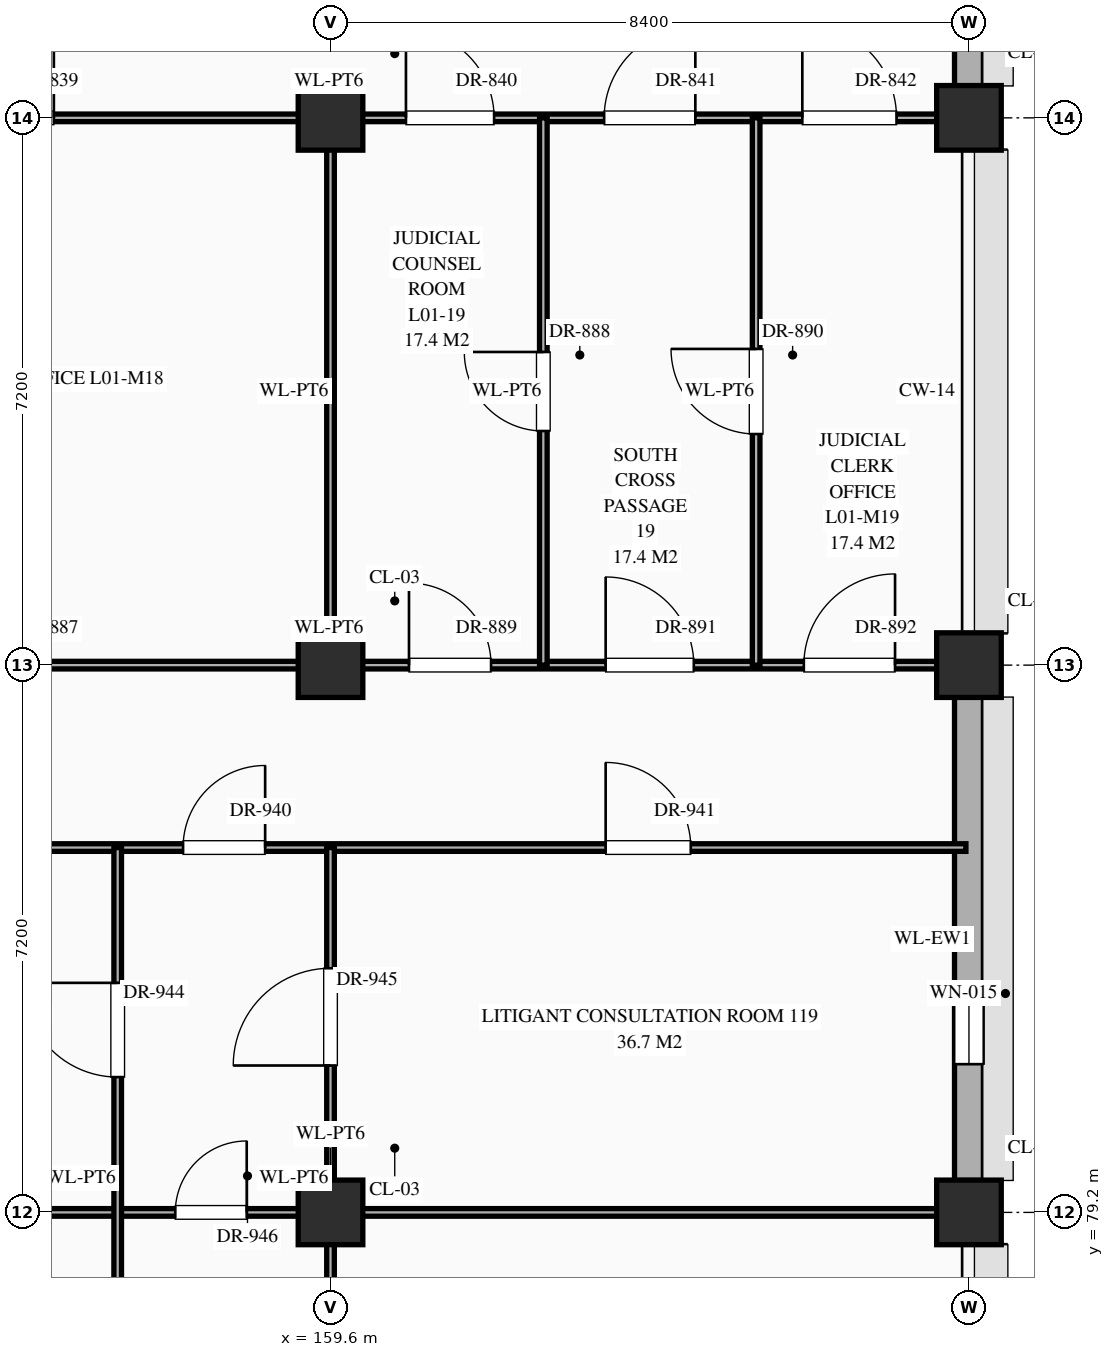
"""IFC4 building model, lengths in metres.
Left out: names, types, materials, properties, quantities, classifications, styles, units other than length and angle.
Written with IfcOpenShell. Run it as: python <this file> out.ifc"""

import sys

from ifc_helpers import new_model, si_unit, direction, frame, frame_2d, origin, origin_2d, place, context, subcontext, project, spatial, rectangle, extrude, element, fill, save


model = new_model("IFC4")
c1 = context("Model", 3, precision=1e-05, world=origin(), true_north=direction((0.0, 1.0)))
c2 = subcontext(c1, "Body", "Model", "MODEL_VIEW")
j1 = project(units=[si_unit("LENGTHUNIT", "METRE"), si_unit("PLANEANGLEUNIT", "RADIAN")], contexts=[c1])
p1 = place(None, origin())
s1 = spatial("IfcSite", under=j1, at=p1, CompositionType="ELEMENT")
p2 = place(p1, origin())
s2 = spatial("IfcBuilding", under=s1, at=p2, CompositionType="ELEMENT")
p3 = place(p2, origin())
s3 = spatial("IfcBuildingStorey", under=s2, at=p3, CompositionType="ELEMENT", Elevation=0.0)
for number, where, z_axis, x_axis in (
    (1, (159.6, 79.2, 0.0), (0.0, 0.0, 1.0), (1.0, 0.0, 0.0)),
    (2, (159.6, 86.4, 0.0), (0.0, 0.0, 1.0), (1.0, 0.0, 0.0)),
    (3, (159.6, 93.6, 0.0), (0.0, 0.0, 1.0), (1.0, 0.0, 0.0)),
    (4, (168.0, 79.2, 0.0), (0.0, 0.0, 1.0), (1.0, 0.0, 0.0)),
    (5, (168.0, 86.4, 0.0), (0.0, 0.0, 1.0), (1.0, 0.0, 0.0)),
    (6, (168.0, 93.6, 0.0), (0.0, 0.0, 1.0), (1.0, 0.0, 0.0)),
):
    element("IfcColumn", number, at=place(p3, frame(where, z_axis=z_axis, x_axis=x_axis)), inside=s3, PredefinedType="COLUMN", context=c2, shape_type="SweptSolid", body=[
        extrude(rectangle(XDim=0.85, YDim=0.85, at=origin_2d()), origin(), (0.0, 0.0, 1.0), 5.4),
    ])
p4 = place(p3, frame((168.0, 79.62, 0.0), z_axis=(0.0, 0.0, 1.0), x_axis=(0.0, 1.0, 0.0)))
e7 = element("IfcWall", 7, at=p4, inside=s3, PredefinedType="STANDARD", context=c2, shape_type="SweptSolid", body=[
    extrude(rectangle(XDim=6.36, YDim=0.38, at=frame_2d((3.18, 0.0))), origin(), (0.0, 0.0, 1.0), 4.47),
])
p5 = place(p4, frame((1.53, 0.0, 0.85)))
e8 = element("IfcOpeningElement", 8, at=p5, cuts=e7, PredefinedType="OPENING", context=c2, shape_type="SweptSolid", body=[
    extrude(rectangle(XDim=0.9, YDim=1.2, at=frame_2d((0.45, 0.6))), frame((0.0, 0.202, 0.0), z_axis=(0.0, -1.0, 0.0), x_axis=(1.0, 0.0, 0.0)), (0.0, 0.0, 1.0), 0.404),
])
p6 = place(p3, frame((168.0, 94.02, 0.0), z_axis=(0.0, 0.0, 1.0), x_axis=(0.0, 1.0, 0.0)))
e9 = element("IfcWall", 9, at=p6, inside=s3, PredefinedType="STANDARD", context=c2, shape_type="SweptSolid", body=[
    extrude(rectangle(XDim=6.36, YDim=0.38, at=frame_2d((3.18, 0.0))), origin(), (0.0, 0.0, 1.0), 4.47),
])
p7 = place(p6, frame((3.955, 0.0, 0.85)))
e10 = element("IfcOpeningElement", 10, at=p7, cuts=e9, PredefinedType="OPENING", context=c2, shape_type="SweptSolid", body=[
    extrude(rectangle(XDim=1.05, YDim=1.56, at=frame_2d((0.525, 0.78))), frame((0.0, 0.202, 0.0), z_axis=(0.0, -1.0, 0.0), x_axis=(1.0, 0.0, 0.0)), (0.0, 0.0, 1.0), 0.404),
])
p8 = place(p3, frame((151.24, 79.2, 0.0), z_axis=(0.0, 0.0, 1.0), x_axis=(1.0, 0.0, 0.0)))
e11 = element("IfcWall", 11, at=p8, inside=s3, PredefinedType="STANDARD", context=c2, shape_type="SweptSolid", body=[
    extrude(rectangle(XDim=16.72, YDim=0.1, at=frame_2d((8.36, 0.0))), origin(), (0.0, 0.0, 1.0), 4.27),
])
p9 = place(p8, frame((6.317, 0.0, 0.0)))
e12 = element("IfcOpeningElement", 12, at=p9, cuts=e11, PredefinedType="OPENING", context=c2, shape_type="SweptSolid", body=[
    extrude(rectangle(XDim=0.94, YDim=2.3, at=frame_2d((0.47, 1.15))), frame((0.0, 0.062, 0.0), z_axis=(0.0, -1.0, 0.0), x_axis=(1.0, 0.0, 0.0)), (0.0, 0.0, 1.0), 0.124),
])
p10 = place(p3, frame((140.0, 84.0, 0.0), z_axis=(0.0, 0.0, 1.0), x_axis=(1.0, 0.0, 0.0)))
e13 = element("IfcWall", 13, at=p10, inside=s3, PredefinedType="STANDARD", context=c2, shape_type="SweptSolid", body=[
    extrude(rectangle(XDim=27.96, YDim=0.1, at=frame_2d((13.98, 0.0))), origin(), (0.0, 0.0, 1.0), 5.12),
])
p11 = place(p10, frame((0.92, 0.0, 0.0)))
e14 = element("IfcOpeningElement", 14, at=p11, cuts=e13, PredefinedType="OPENING", context=c2, shape_type="SweptSolid", body=[
    extrude(rectangle(XDim=0.96, YDim=2.2, at=frame_2d((0.48, 1.1))), frame((0.0, 0.062, 0.0), z_axis=(0.0, -1.0, 0.0), x_axis=(1.0, 0.0, 0.0)), (0.0, 0.0, 1.0), 0.124),
])
p12 = place(p10, frame((6.5, 0.0, 0.0)))
e15 = element("IfcOpeningElement", 15, at=p12, cuts=e13, PredefinedType="OPENING", context=c2, shape_type="SweptSolid", body=[
    extrude(rectangle(XDim=1.0, YDim=2.25, at=frame_2d((0.5, 1.125))), frame((0.0, 0.062, 0.0), z_axis=(0.0, -1.0, 0.0), x_axis=(1.0, 0.0, 0.0)), (0.0, 0.0, 1.0), 0.124),
])
p13 = place(p10, frame((13.48, 0.0, 0.0)))
e16 = element("IfcOpeningElement", 16, at=p13, cuts=e13, PredefinedType="OPENING", context=c2, shape_type="SweptSolid", body=[
    extrude(rectangle(XDim=1.04, YDim=2.2, at=frame_2d((0.52, 1.1))), frame((0.0, 0.062, 0.0), z_axis=(0.0, -1.0, 0.0), x_axis=(1.0, 0.0, 0.0)), (0.0, 0.0, 1.0), 0.124),
])
p14 = place(p10, frame((17.66, 0.0, 0.0)))
e17 = element("IfcOpeningElement", 17, at=p14, cuts=e13, PredefinedType="OPENING", context=c2, shape_type="SweptSolid", body=[
    extrude(rectangle(XDim=1.08, YDim=2.25, at=frame_2d((0.54, 1.125))), frame((0.0, 0.062, 0.0), z_axis=(0.0, -1.0, 0.0), x_axis=(1.0, 0.0, 0.0)), (0.0, 0.0, 1.0), 0.124),
])
p15 = place(p10, frame((23.22, 0.0, 0.0)))
e18 = element("IfcOpeningElement", 18, at=p15, cuts=e13, PredefinedType="OPENING", context=c2, shape_type="SweptSolid", body=[
    extrude(rectangle(XDim=1.12, YDim=2.25, at=frame_2d((0.56, 1.125))), frame((0.0, 0.062, 0.0), z_axis=(0.0, -1.0, 0.0), x_axis=(1.0, 0.0, 0.0)), (0.0, 0.0, 1.0), 0.124),
])
p16 = place(p3, frame((151.2, 86.4, 0.0), z_axis=(0.0, 0.0, 1.0), x_axis=(1.0, 0.0, 0.0)))
e19 = element("IfcWall", 19, at=p16, inside=s3, PredefinedType="STANDARD", context=c2, shape_type="SweptSolid", body=[
    extrude(rectangle(XDim=16.76, YDim=0.1, at=frame_2d((8.38, 0.0))), origin(), (0.0, 0.0, 1.0), 4.27),
])
p17 = place(p16, frame((3.7, 0.0, 0.0)))
e20 = element("IfcOpeningElement", 20, at=p17, cuts=e19, PredefinedType="OPENING", context=c2, shape_type="SweptSolid", body=[
    extrude(rectangle(XDim=1.0, YDim=2.25, at=frame_2d((0.5, 1.125))), frame((0.0, 0.062, 0.0), z_axis=(0.0, -1.0, 0.0), x_axis=(1.0, 0.0, 0.0)), (0.0, 0.0, 1.0), 0.124),
])
p18 = place(p16, frame((9.433, 0.0, 0.0)))
e21 = element("IfcOpeningElement", 21, at=p18, cuts=e19, PredefinedType="OPENING", context=c2, shape_type="SweptSolid", body=[
    extrude(rectangle(XDim=1.08, YDim=2.25, at=frame_2d((0.54, 1.125))), frame((0.0, 0.062, 0.0), z_axis=(0.0, -1.0, 0.0), x_axis=(1.0, 0.0, 0.0)), (0.0, 0.0, 1.0), 0.124),
])
p19 = place(p16, frame((12.02, 0.0, 0.0)))
e22 = element("IfcOpeningElement", 22, at=p19, cuts=e19, PredefinedType="OPENING", context=c2, shape_type="SweptSolid", body=[
    extrude(rectangle(XDim=1.16, YDim=2.3, at=frame_2d((0.58, 1.15))), frame((0.0, 0.062, 0.0), z_axis=(0.0, -1.0, 0.0), x_axis=(1.0, 0.0, 0.0)), (0.0, 0.0, 1.0), 0.124),
])
p20 = place(p16, frame((14.627, 0.0, 0.0)))
e23 = element("IfcOpeningElement", 23, at=p20, cuts=e19, PredefinedType="OPENING", context=c2, shape_type="SweptSolid", body=[
    extrude(rectangle(XDim=1.2, YDim=2.35, at=frame_2d((0.6, 1.175))), frame((0.0, 0.062, 0.0), z_axis=(0.0, -1.0, 0.0), x_axis=(1.0, 0.0, 0.0)), (0.0, 0.0, 1.0), 0.124),
])
p21 = place(p3, frame((151.2, 93.6, 0.0), z_axis=(0.0, 0.0, 1.0), x_axis=(1.0, 0.0, 0.0)))
e24 = element("IfcWall", 24, at=p21, inside=s3, PredefinedType="STANDARD", context=c2, shape_type="SweptSolid", body=[
    extrude(rectangle(XDim=16.76, YDim=0.1, at=frame_2d((8.38, 0.0))), origin(), (0.0, 0.0, 1.0), 4.27),
])
p22 = place(p21, frame((3.64, 0.0, 0.0)))
e25 = element("IfcOpeningElement", 25, at=p22, cuts=e24, PredefinedType="OPENING", context=c2, shape_type="SweptSolid", body=[
    extrude(rectangle(XDim=1.12, YDim=2.25, at=frame_2d((0.56, 1.125))), frame((0.0, 0.062, 0.0), z_axis=(0.0, -1.0, 0.0), x_axis=(1.0, 0.0, 0.0)), (0.0, 0.0, 1.0), 0.124),
])
p23 = place(p21, frame((9.393, 0.0, 0.0)))
e26 = element("IfcOpeningElement", 26, at=p23, cuts=e24, PredefinedType="OPENING", context=c2, shape_type="SweptSolid", body=[
    extrude(rectangle(XDim=1.16, YDim=2.3, at=frame_2d((0.58, 1.15))), frame((0.0, 0.062, 0.0), z_axis=(0.0, -1.0, 0.0), x_axis=(1.0, 0.0, 0.0)), (0.0, 0.0, 1.0), 0.124),
])
p24 = place(p21, frame((12.0, 0.0, 0.0)))
e27 = element("IfcOpeningElement", 27, at=p24, cuts=e24, PredefinedType="OPENING", context=c2, shape_type="SweptSolid", body=[
    extrude(rectangle(XDim=1.2, YDim=2.35, at=frame_2d((0.6, 1.175))), frame((0.0, 0.062, 0.0), z_axis=(0.0, -1.0, 0.0), x_axis=(1.0, 0.0, 0.0)), (0.0, 0.0, 1.0), 0.124),
])
p25 = place(p21, frame((14.607, 0.0, 0.0)))
e28 = element("IfcOpeningElement", 28, at=p25, cuts=e24, PredefinedType="OPENING", context=c2, shape_type="SweptSolid", body=[
    extrude(rectangle(XDim=1.24, YDim=2.3, at=frame_2d((0.62, 1.15))), frame((0.0, 0.062, 0.0), z_axis=(0.0, -1.0, 0.0), x_axis=(1.0, 0.0, 0.0)), (0.0, 0.0, 1.0), 0.124),
])
p26 = place(p3, frame((156.8, 57.6, 0.0), z_axis=(0.0, 0.0, 1.0), x_axis=(0.0, 1.0, 0.0)))
e29 = element("IfcWall", 29, at=p26, inside=s3, PredefinedType="STANDARD", context=c2, shape_type="SweptSolid", body=[
    extrude(rectangle(XDim=26.4, YDim=0.1, at=frame_2d((13.2, 0.0))), origin(), (0.0, 0.0, 1.0), 5.12),
])
p27 = place(p26, frame((23.38, 0.0, 0.0)))
e30 = element("IfcOpeningElement", 30, at=p27, cuts=e29, PredefinedType="OPENING", context=c2, shape_type="SweptSolid", body=[
    extrude(rectangle(XDim=1.24, YDim=2.3, at=frame_2d((0.62, 1.15))), frame((0.0, 0.062, 0.0), z_axis=(0.0, -1.0, 0.0), x_axis=(1.0, 0.0, 0.0)), (0.0, 0.0, 1.0), 0.124),
])
p28 = place(p26, frame((3.07, 0.0, 0.0)))
e31 = element("IfcOpeningElement", 31, at=p28, cuts=e29, PredefinedType="OPENING", context=c2, shape_type="SweptSolid", body=[
    extrude(rectangle(XDim=1.06, YDim=2.4, at=frame_2d((0.53, 1.2))), frame((0.0, 0.062, 0.0), z_axis=(0.0, -1.0, 0.0), x_axis=(1.0, 0.0, 0.0)), (0.0, 0.0, 1.0), 0.124),
])
p29 = place(p26, frame((10.23, 0.0, 0.0)))
e32 = element("IfcOpeningElement", 32, at=p29, cuts=e29, PredefinedType="OPENING", context=c2, shape_type="SweptSolid", body=[
    extrude(rectangle(XDim=1.14, YDim=2.4, at=frame_2d((0.57, 1.2))), frame((0.0, 0.062, 0.0), z_axis=(0.0, -1.0, 0.0), x_axis=(1.0, 0.0, 0.0)), (0.0, 0.0, 1.0), 0.124),
])
p30 = place(p26, frame((17.55, 0.0, 0.0)))
e33 = element("IfcOpeningElement", 33, at=p30, cuts=e29, PredefinedType="OPENING", context=c2, shape_type="SweptSolid", body=[
    extrude(rectangle(XDim=0.9, YDim=2.15, at=frame_2d((0.45, 1.075))), frame((0.0, 0.062, 0.0), z_axis=(0.0, -1.0, 0.0), x_axis=(1.0, 0.0, 0.0)), (0.0, 0.0, 1.0), 0.124),
])
p31 = place(p3, frame((159.6, 43.2, 0.0), z_axis=(0.0, 0.0, 1.0), x_axis=(0.0, 1.0, 0.0)))
e34 = element("IfcWall", 34, at=p31, inside=s3, PredefinedType="STANDARD", context=c2, shape_type="SweptSolid", body=[
    extrude(rectangle(XDim=40.8, YDim=0.1, at=frame_2d((20.4, 0.0))), origin(), (0.0, 0.0, 1.0), 4.37),
])
p32 = place(p31, frame((37.933, 0.0, 0.0)))
e35 = element("IfcOpeningElement", 35, at=p32, cuts=e34, PredefinedType="OPENING", context=c2, shape_type="SweptSolid", body=[
    extrude(rectangle(XDim=1.28, YDim=2.35, at=frame_2d((0.64, 1.175))), frame((0.0, 0.062, 0.0), z_axis=(0.0, -1.0, 0.0), x_axis=(1.0, 0.0, 0.0)), (0.0, 0.0, 1.0), 0.124),
])
p33 = place(p31, frame((0.942, 0.0, 0.0)))
e36 = element("IfcOpeningElement", 36, at=p33, cuts=e34, PredefinedType="OPENING", context=c2, shape_type="SweptSolid", body=[
    extrude(rectangle(XDim=0.86, YDim=2.1, at=frame_2d((0.43, 1.05))), frame((0.0, 0.062, 0.0), z_axis=(0.0, -1.0, 0.0), x_axis=(1.0, 0.0, 0.0)), (0.0, 0.0, 1.0), 0.124),
])
p34 = place(p31, frame((4.167, 0.0, 0.0)))
e37 = element("IfcOpeningElement", 37, at=p34, cuts=e34, PredefinedType="OPENING", context=c2, shape_type="SweptSolid", body=[
    extrude(rectangle(XDim=0.92, YDim=2.15, at=frame_2d((0.46, 1.075))), frame((0.0, 0.062, 0.0), z_axis=(0.0, -1.0, 0.0), x_axis=(1.0, 0.0, 0.0)), (0.0, 0.0, 1.0), 0.124),
])
p35 = place(p31, frame((10.32, 0.0, 0.0)))
e38 = element("IfcOpeningElement", 38, at=p35, cuts=e34, PredefinedType="OPENING", context=c2, shape_type="SweptSolid", body=[
    extrude(rectangle(XDim=0.96, YDim=2.2, at=frame_2d((0.48, 1.1))), frame((0.0, 0.062, 0.0), z_axis=(0.0, -1.0, 0.0), x_axis=(1.0, 0.0, 0.0)), (0.0, 0.0, 1.0), 0.124),
])
p36 = place(p31, frame((17.5, 0.0, 0.0)))
e39 = element("IfcOpeningElement", 39, at=p36, cuts=e34, PredefinedType="OPENING", context=c2, shape_type="SweptSolid", body=[
    extrude(rectangle(XDim=1.0, YDim=2.25, at=frame_2d((0.5, 1.125))), frame((0.0, 0.062, 0.0), z_axis=(0.0, -1.0, 0.0), x_axis=(1.0, 0.0, 0.0)), (0.0, 0.0, 1.0), 0.124),
])
p37 = place(p31, frame((24.68, 0.0, 0.0)))
e40 = element("IfcOpeningElement", 40, at=p37, cuts=e34, PredefinedType="OPENING", context=c2, shape_type="SweptSolid", body=[
    extrude(rectangle(XDim=1.04, YDim=2.2, at=frame_2d((0.52, 1.1))), frame((0.0, 0.062, 0.0), z_axis=(0.0, -1.0, 0.0), x_axis=(1.0, 0.0, 0.0)), (0.0, 0.0, 1.0), 0.124),
])
p38 = place(p31, frame((31.86, 0.0, 0.0)))
e41 = element("IfcOpeningElement", 41, at=p38, cuts=e34, PredefinedType="OPENING", context=c2, shape_type="SweptSolid", body=[
    extrude(rectangle(XDim=1.08, YDim=2.25, at=frame_2d((0.54, 1.125))), frame((0.0, 0.062, 0.0), z_axis=(0.0, -1.0, 0.0), x_axis=(1.0, 0.0, 0.0)), (0.0, 0.0, 1.0), 0.124),
])
p39 = place(p3, frame((159.6, 86.4, 0.0), z_axis=(0.0, 0.0, 1.0), x_axis=(0.0, 1.0, 0.0)))
e42 = element("IfcWall", 42, at=p39, inside=s3, PredefinedType="STANDARD", context=c2, shape_type="SweptSolid", body=[
    extrude(rectangle(XDim=7.2, YDim=0.1, at=frame_2d((3.6, 0.0))), origin(), (0.0, 0.0, 1.0), 4.37),
])
p40 = place(p3, frame((162.4, 86.4, 0.0), z_axis=(0.0, 0.0, 1.0), x_axis=(0.0, 1.0, 0.0)))
e43 = element("IfcWall", 43, at=p40, inside=s3, PredefinedType="STANDARD", context=c2, shape_type="SweptSolid", body=[
    extrude(rectangle(XDim=7.2, YDim=0.1, at=frame_2d((3.6, 0.0))), origin(), (0.0, 0.0, 1.0), 5.12),
])
p41 = place(p40, frame((3.08, 0.0, 0.0)))
e44 = element("IfcOpeningElement", 44, at=p41, cuts=e43, PredefinedType="OPENING", context=c2, shape_type="SweptSolid", body=[
    extrude(rectangle(XDim=1.04, YDim=2.2, at=frame_2d((0.52, 1.1))), frame((0.0, 0.062, 0.0), z_axis=(0.0, -1.0, 0.0), x_axis=(1.0, 0.0, 0.0)), (0.0, 0.0, 1.0), 0.124),
])
p42 = place(p3, frame((165.2, 86.4, 0.0), z_axis=(0.0, 0.0, 1.0), x_axis=(0.0, 1.0, 0.0)))
e45 = element("IfcWall", 45, at=p42, inside=s3, PredefinedType="STANDARD", context=c2, shape_type="SweptSolid", body=[
    extrude(rectangle(XDim=7.2, YDim=0.1, at=frame_2d((3.6, 0.0))), origin(), (0.0, 0.0, 1.0), 5.12),
])
p43 = place(p42, frame((3.04, 0.0, 0.0)))
e46 = element("IfcOpeningElement", 46, at=p43, cuts=e45, PredefinedType="OPENING", context=c2, shape_type="SweptSolid", body=[
    extrude(rectangle(XDim=1.12, YDim=2.25, at=frame_2d((0.56, 1.125))), frame((0.0, 0.062, 0.0), z_axis=(0.0, -1.0, 0.0), x_axis=(1.0, 0.0, 0.0)), (0.0, 0.0, 1.0), 0.124),
])
p44 = place(p5, origin())
e47 = element("IfcWindow", 47, at=p44, inside=s3, PartitioningType="SINGLE_PANEL", PredefinedType="WINDOW", context=c2, shape_type="SweptSolid", body=[
    extrude(rectangle(XDim=0.9, YDim=1.2, at=frame_2d((0.45, 0.6))), frame((0.0, 0.03, 0.0), z_axis=(0.0, -1.0, 0.0), x_axis=(1.0, 0.0, 0.0)), (0.0, 0.0, 1.0), 0.06),
])
fill(e8, e47)
p45 = place(p22, origin())
e48 = element("IfcDoor", 48, at=p45, inside=s3, OperationType="SINGLE_SWING_RIGHT", PredefinedType="DOOR", context=c2, shape_type="SweptSolid", body=[
    extrude(rectangle(XDim=1.12, YDim=2.25, at=frame_2d((0.56, 1.125))), frame((0.0, 0.025, 0.0), z_axis=(0.0, -1.0, 0.0), x_axis=(1.0, 0.0, 0.0)), (0.0, 0.0, 1.0), 0.05),
])
fill(e25, e48)
p46 = place(p23, origin())
e49 = element("IfcDoor", 49, at=p46, inside=s3, OperationType="SINGLE_SWING_LEFT", PredefinedType="DOOR", context=c2, shape_type="SweptSolid", body=[
    extrude(rectangle(XDim=1.16, YDim=2.3, at=frame_2d((0.58, 1.15))), frame((0.0, 0.025, 0.0), z_axis=(0.0, -1.0, 0.0), x_axis=(1.0, 0.0, 0.0)), (0.0, 0.0, 1.0), 0.05),
])
fill(e26, e49)
p47 = place(p24, origin())
e50 = element("IfcDoor", 50, at=p47, inside=s3, OperationType="SINGLE_SWING_RIGHT", PredefinedType="DOOR", context=c2, shape_type="SweptSolid", body=[
    extrude(rectangle(XDim=1.2, YDim=2.35, at=frame_2d((0.6, 1.175))), frame((0.0, 0.025, 0.0), z_axis=(0.0, -1.0, 0.0), x_axis=(1.0, 0.0, 0.0)), (0.0, 0.0, 1.0), 0.05),
])
fill(e27, e50)
p48 = place(p25, origin())
e51 = element("IfcDoor", 51, at=p48, inside=s3, OperationType="SINGLE_SWING_LEFT", PredefinedType="DOOR", context=c2, shape_type="SweptSolid", body=[
    extrude(rectangle(XDim=1.24, YDim=2.3, at=frame_2d((0.62, 1.15))), frame((0.0, 0.025, 0.0), z_axis=(0.0, -1.0, 0.0), x_axis=(1.0, 0.0, 0.0)), (0.0, 0.0, 1.0), 0.05),
])
fill(e28, e51)
p49 = place(p41, origin())
e52 = element("IfcDoor", 52, at=p49, inside=s3, OperationType="SINGLE_SWING_RIGHT", PredefinedType="DOOR", context=c2, shape_type="SweptSolid", body=[
    extrude(rectangle(XDim=1.04, YDim=2.2, at=frame_2d((0.52, 1.1))), frame((0.0, 0.025, 0.0), z_axis=(0.0, -1.0, 0.0), x_axis=(1.0, 0.0, 0.0)), (0.0, 0.0, 1.0), 0.05),
])
fill(e44, e52)
p50 = place(p18, origin())
e53 = element("IfcDoor", 53, at=p50, inside=s3, OperationType="SINGLE_SWING_LEFT", PredefinedType="DOOR", context=c2, shape_type="SweptSolid", body=[
    extrude(rectangle(XDim=1.08, YDim=2.25, at=frame_2d((0.54, 1.125))), frame((0.0, 0.025, 0.0), z_axis=(0.0, -1.0, 0.0), x_axis=(1.0, 0.0, 0.0)), (0.0, 0.0, 1.0), 0.05),
])
fill(e21, e53)
p51 = place(p43, origin())
e54 = element("IfcDoor", 54, at=p51, inside=s3, OperationType="SINGLE_SWING_RIGHT", PredefinedType="DOOR", context=c2, shape_type="SweptSolid", body=[
    extrude(rectangle(XDim=1.12, YDim=2.25, at=frame_2d((0.56, 1.125))), frame((0.0, 0.025, 0.0), z_axis=(0.0, -1.0, 0.0), x_axis=(1.0, 0.0, 0.0)), (0.0, 0.0, 1.0), 0.05),
])
fill(e46, e54)
p52 = place(p19, origin())
e55 = element("IfcDoor", 55, at=p52, inside=s3, OperationType="SINGLE_SWING_LEFT", PredefinedType="DOOR", context=c2, shape_type="SweptSolid", body=[
    extrude(rectangle(XDim=1.16, YDim=2.3, at=frame_2d((0.58, 1.15))), frame((0.0, 0.025, 0.0), z_axis=(0.0, -1.0, 0.0), x_axis=(1.0, 0.0, 0.0)), (0.0, 0.0, 1.0), 0.05),
])
fill(e22, e55)
p53 = place(p20, origin())
e56 = element("IfcDoor", 56, at=p53, inside=s3, OperationType="SINGLE_SWING_RIGHT", PredefinedType="DOOR", context=c2, shape_type="SweptSolid", body=[
    extrude(rectangle(XDim=1.2, YDim=2.35, at=frame_2d((0.6, 1.175))), frame((0.0, 0.025, 0.0), z_axis=(0.0, -1.0, 0.0), x_axis=(1.0, 0.0, 0.0)), (0.0, 0.0, 1.0), 0.05),
])
fill(e23, e56)
p54 = place(p14, origin())
e57 = element("IfcDoor", 57, at=p54, inside=s3, OperationType="SINGLE_SWING_RIGHT", PredefinedType="DOOR", context=c2, shape_type="SweptSolid", body=[
    extrude(rectangle(XDim=1.08, YDim=2.25, at=frame_2d((0.54, 1.125))), frame((0.0, 0.025, 0.0), z_axis=(0.0, -1.0, 0.0), x_axis=(1.0, 0.0, 0.0)), (0.0, 0.0, 1.0), 0.05),
])
fill(e17, e57)
p55 = place(p15, origin())
e58 = element("IfcDoor", 58, at=p55, inside=s3, OperationType="SINGLE_SWING_LEFT", PredefinedType="DOOR", context=c2, shape_type="SweptSolid", body=[
    extrude(rectangle(XDim=1.12, YDim=2.25, at=frame_2d((0.56, 1.125))), frame((0.0, 0.025, 0.0), z_axis=(0.0, -1.0, 0.0), x_axis=(1.0, 0.0, 0.0)), (0.0, 0.0, 1.0), 0.05),
])
fill(e18, e58)
p56 = place(p27, origin())
e59 = element("IfcDoor", 59, at=p56, inside=s3, OperationType="SINGLE_SWING_RIGHT", PredefinedType="DOOR", context=c2, shape_type="SweptSolid", body=[
    extrude(rectangle(XDim=1.24, YDim=2.3, at=frame_2d((0.62, 1.15))), frame((0.0, 0.025, 0.0), z_axis=(0.0, -1.0, 0.0), x_axis=(1.0, 0.0, 0.0)), (0.0, 0.0, 1.0), 0.05),
])
fill(e30, e59)
p57 = place(p32, origin())
e60 = element("IfcDoor", 60, at=p57, inside=s3, OperationType="SINGLE_SWING_LEFT", PredefinedType="DOOR", context=c2, shape_type="SweptSolid", body=[
    extrude(rectangle(XDim=1.28, YDim=2.35, at=frame_2d((0.64, 1.175))), frame((0.0, 0.025, 0.0), z_axis=(0.0, -1.0, 0.0), x_axis=(1.0, 0.0, 0.0)), (0.0, 0.0, 1.0), 0.05),
])
fill(e35, e60)
p58 = place(p9, origin())
e61 = element("IfcDoor", 61, at=p58, inside=s3, OperationType="SINGLE_SWING_RIGHT", PredefinedType="DOOR", context=c2, shape_type="SweptSolid", body=[
    extrude(rectangle(XDim=0.94, YDim=2.3, at=frame_2d((0.47, 1.15))), frame((0.0, 0.025, 0.0), z_axis=(0.0, -1.0, 0.0), x_axis=(1.0, 0.0, 0.0)), (0.0, 0.0, 1.0), 0.05),
])
fill(e12, e61)
save(model, sys.argv[1])
